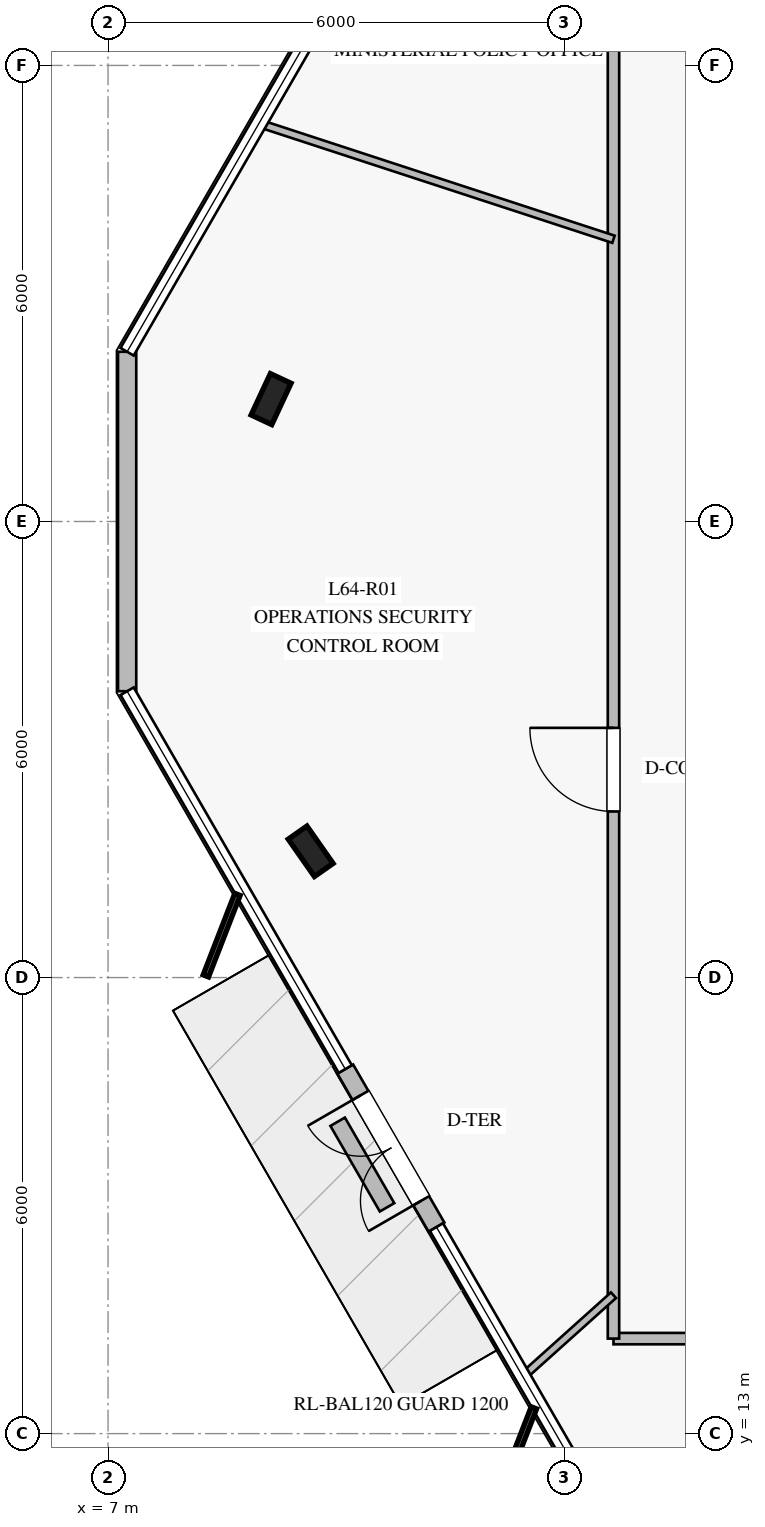
"""IFC4 building model, lengths in metres.
Left out: names, types, materials, properties, quantities, classifications, styles, units other than length and angle.
Written with IfcOpenShell. Run it as: python <this file> out.ifc"""

import sys

from ifc_helpers import new_model, si_unit, direction, frame, frame_2d, origin, origin_2d, place, context, subcontext, project, spatial, rectangle, i_section, extrude, element, fill, save


model = new_model("IFC4")
c1 = context("Model", 3, precision=1e-05, world=origin(), true_north=direction((0.0, 1.0)))
c2 = subcontext(c1, "Body", "Model", "MODEL_VIEW")
j1 = project(units=[si_unit("LENGTHUNIT", "METRE"), si_unit("PLANEANGLEUNIT", "RADIAN")], contexts=[c1])
p1 = place(None, origin())
s1 = spatial("IfcSite", under=j1, at=p1, CompositionType="ELEMENT")
p2 = place(p1, origin())
s2 = spatial("IfcBuilding", under=s1, at=p2, CompositionType="ELEMENT")
p3 = place(p2, frame((0.0, 0.0, 266.2)))
s3 = spatial("IfcBuildingStorey", under=s2, at=p3, CompositionType="ELEMENT", Elevation=266.2)
for number, where, z_axis, x_axis in (
    (1, (9.145, 26.61, 0.0), (0.0, 0.0, 1.0), (0.423, 0.906, 0.0)),
    (2, (9.666, 20.661, 0.0), (0.0, 0.0, 1.0), (-0.574, 0.819, 0.0)),
):
    element("IfcColumn", number, at=place(p3, frame(where, z_axis=z_axis, x_axis=x_axis)), inside=s3, PredefinedType="COLUMN", context=c2, shape_type="SweptSolid", body=[
        extrude(i_section(OverallWidth=0.3, OverallDepth=0.6, WebThickness=0.015, FlangeThickness=0.03, at=origin_2d()), origin(), (0.0, 0.0, 1.0), 4.0),
    ])
p4 = place(p3, frame((7.251, 27.233, 0.0), z_axis=(0.0, 0.0, 1.0), x_axis=(0.0, -1.0, 0.0)))
e3 = element("IfcWall", 3, at=p4, inside=s3, PredefinedType="STANDARD", context=c2, shape_type="SweptSolid", body=[
    extrude(rectangle(XDim=4.466, YDim=0.24, at=frame_2d((2.233, 0.0))), origin(), (0.0, 0.0, 1.0), 3.78),
])
p5 = place(p3, frame((10.121, 17.796, 0.0), z_axis=(0.0, 0.0, 1.0), x_axis=(0.499913221443, -0.866075499611, 0.0)))
e4 = element("IfcWall", 4, at=p5, inside=s3, PredefinedType="STANDARD", context=c2, shape_type="SweptSolid", body=[
    extrude(rectangle(XDim=2.4, YDim=0.24, at=frame_2d((1.2, 0.0))), origin(), (0.0, 0.0, 1.0), 3.78),
])
p6 = place(p5, frame((0.4, 0.0, 0.0)))
e5 = element("IfcOpeningElement", 5, at=p6, cuts=e4, PredefinedType="OPENING", context=c2, shape_type="SweptSolid", body=[
    extrude(rectangle(XDim=1.6, YDim=2.25, at=frame_2d((0.8, 1.125))), frame((0.0, 0.13, 0.0), z_axis=(0.0, -1.0, 0.0), x_axis=(1.0, 0.0, 0.0)), (0.0, 0.0, 1.0), 0.26),
])
p7 = place(p3, frame((10.021, 17.103, 0.0), z_axis=(0.0, 0.0, 1.0), x_axis=(0.49989585183, -0.866085525409, 0.0)))
e6 = element("IfcWall", 6, at=p7, inside=s3, PredefinedType="USERDEFINED", context=c2, shape_type="SweptSolid", body=[
    extrude(rectangle(XDim=1.3, YDim=0.22, at=frame_2d((0.65, 0.0))), origin(), (0.0, 0.0, 1.0), 0.4),
])
p8 = place(p3, frame((36.35, 14.25, 0.0), z_axis=(0.0, 0.0, 1.0), x_axis=(-1.0, 0.0, 0.0)))
e7 = element("IfcWall", 7, at=p8, inside=s3, PredefinedType="PARTITIONING", context=c2, shape_type="SweptSolid", body=[
    extrude(rectangle(XDim=22.7, YDim=0.15, at=frame_2d((11.35, 0.0))), origin(), (0.0, 0.0, 1.0), 2.43),
])
p9 = place(p8, frame((12.136, 0.0, 0.0)))
e8 = element("IfcOpeningElement", 8, at=p9, cuts=e7, PredefinedType="OPENING", context=c2, shape_type="SweptSolid", body=[
    extrude(rectangle(XDim=1.1, YDim=2.2, at=frame_2d((0.55, 1.1))), frame((0.0, 0.085, 0.0), z_axis=(0.0, -1.0, 0.0), x_axis=(1.0, 0.0, 0.0)), (0.0, 0.0, 1.0), 0.17),
])
p10 = place(p8, frame((18.391, 0.0, 0.0)))
e9 = element("IfcOpeningElement", 9, at=p10, cuts=e7, PredefinedType="OPENING", context=c2, shape_type="SweptSolid", body=[
    extrude(rectangle(XDim=1.1, YDim=2.2, at=frame_2d((0.55, 1.1))), frame((0.0, 0.085, 0.0), z_axis=(0.0, -1.0, 0.0), x_axis=(1.0, 0.0, 0.0)), (0.0, 0.0, 1.0), 0.17),
])
p11 = place(p3, frame((13.65, 14.25, 0.0), z_axis=(0.0, 0.0, 1.0), x_axis=(0.0, 1.0, 0.0)))
e10 = element("IfcWall", 10, at=p11, inside=s3, PredefinedType="PARTITIONING", context=c2, shape_type="SweptSolid", body=[
    extrude(rectangle(XDim=21.5, YDim=0.15, at=frame_2d((10.75, 0.0))), origin(), (0.0, 0.0, 1.0), 3.28),
])
p12 = place(p11, frame((6.935, 0.0, 0.0)))
e11 = element("IfcOpeningElement", 11, at=p12, cuts=e10, PredefinedType="OPENING", context=c2, shape_type="SweptSolid", body=[
    extrude(rectangle(XDim=1.1, YDim=2.2, at=frame_2d((0.55, 1.1))), frame((0.0, 0.085, 0.0), z_axis=(0.0, -1.0, 0.0), x_axis=(1.0, 0.0, 0.0)), (0.0, 0.0, 1.0), 0.17),
])
p13 = place(p3, frame((13.65, 28.713, 0.0), z_axis=(0.0, 0.0, 1.0), x_axis=(-0.950465262527, 0.310830797589, 0.0)))
e12 = element("IfcWall", 12, at=p13, inside=s3, PredefinedType="MOVABLE", context=c2, shape_type="SweptSolid", body=[
    extrude(rectangle(XDim=4.89, YDim=0.1, at=frame_2d((2.445, 0.0))), origin(), (0.0, 0.0, 1.0), 3.28),
])
p14 = place(p3, frame((13.65, 14.821, 0.0), z_axis=(0.0, 0.0, 1.0), x_axis=(-0.744157958849, -0.668003691818, 0.0)))
e13 = element("IfcWall", 13, at=p14, inside=s3, PredefinedType="MOVABLE", context=c2, shape_type="SweptSolid", body=[
    extrude(rectangle(XDim=1.587, YDim=0.1, at=frame_2d((0.793, 0.0))), origin(), (0.0, 0.0, 1.0), 3.28),
])
p15 = place(p6, frame((1.6, 0.0, 0.0), z_axis=(0.0, 0.0, 1.0), x_axis=(-1.0, 0.0, 0.0)))
e14 = element("IfcDoor", 14, at=p15, inside=s3, OperationType="DOUBLE_DOOR_SINGLE_SWING", PredefinedType="DOOR", context=c2, shape_type="SweptSolid", body=[
    extrude(rectangle(XDim=1.6, YDim=2.25, at=frame_2d((0.8, 1.125))), frame((0.0, 0.025, 0.0), z_axis=(0.0, -1.0, 0.0), x_axis=(1.0, 0.0, 0.0)), (0.0, 0.0, 1.0), 0.05),
])
fill(e5, e14)
p16 = place(p12, origin())
e15 = element("IfcDoor", 15, at=p16, inside=s3, OperationType="SINGLE_SWING_RIGHT", PredefinedType="DOOR", context=c2, shape_type="SweptSolid", body=[
    extrude(rectangle(XDim=1.1, YDim=2.2, at=frame_2d((0.55, 1.1))), frame((0.0, 0.025, 0.0), z_axis=(0.0, -1.0, 0.0), x_axis=(1.0, 0.0, 0.0)), (0.0, 0.0, 1.0), 0.05),
])
fill(e11, e15)
save(model, sys.argv[1])
